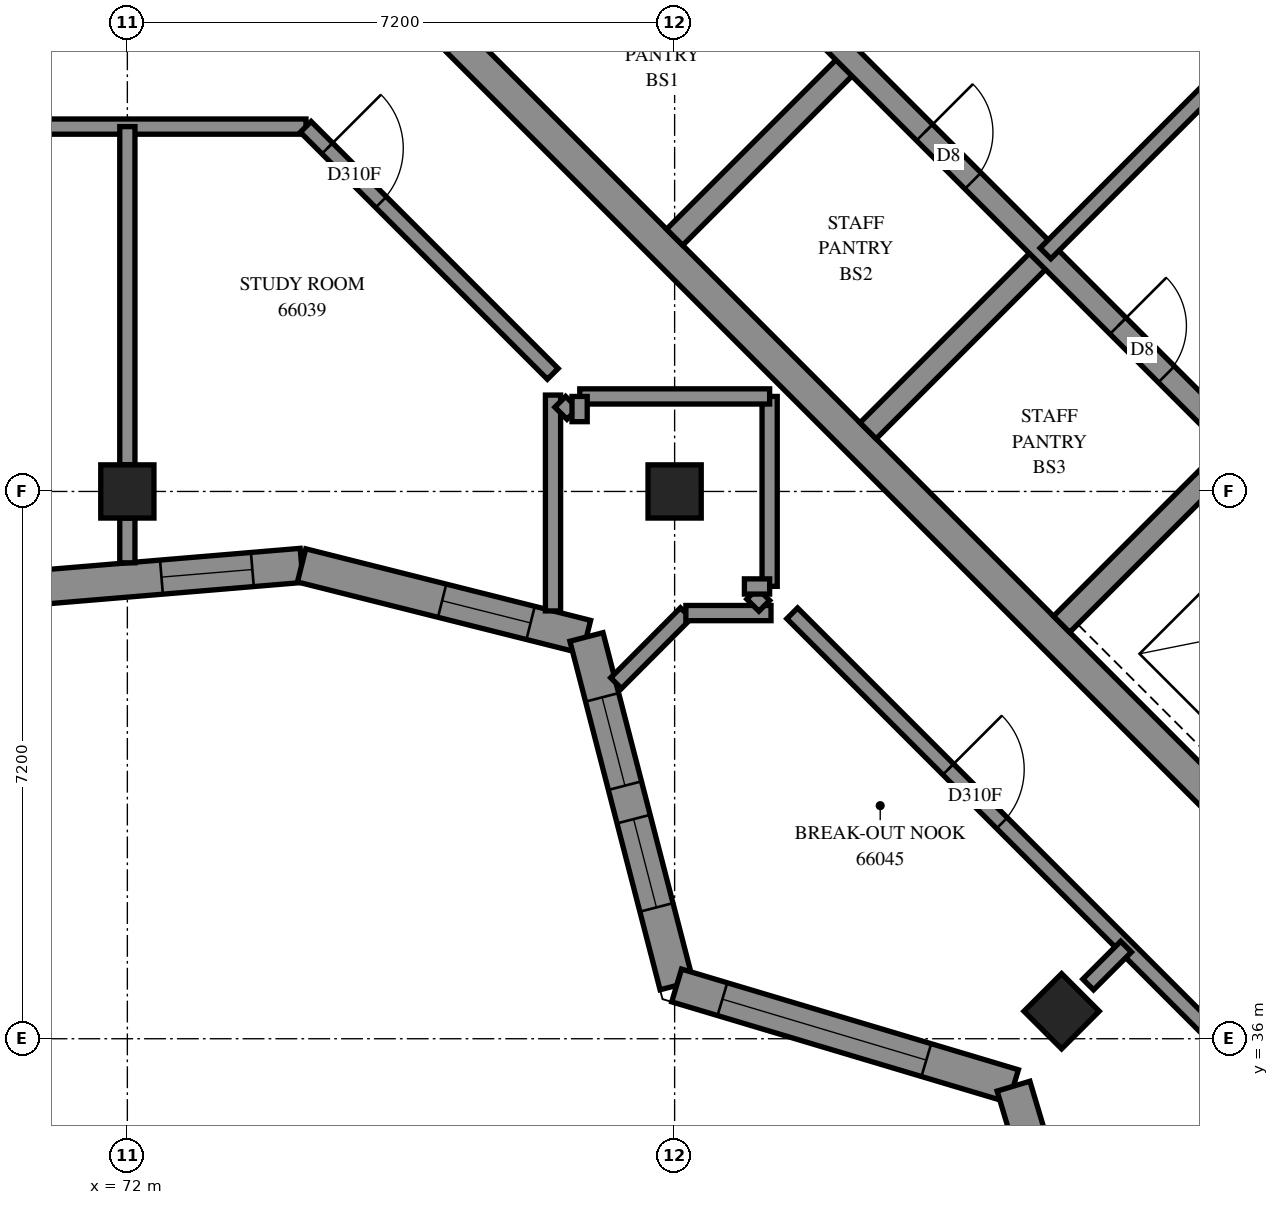
"""IFC4 building model, lengths in metres.
Left out: names, types, materials, properties, quantities, classifications, styles, units other than length and angle.
Written with IfcOpenShell. Run it as: python <this file> out.ifc"""

import sys

from ifc_helpers import new_model, si_unit, direction, frame, frame_2d, origin, origin_2d, place, context, subcontext, project, spatial, polyline, rectangle, outline, extrude, element, fill, save


model = new_model("IFC4")
c1 = context("Model", 3, precision=1e-05, world=origin(), true_north=direction((0.0, 1.0)))
c2 = subcontext(c1, "Body", "Model", "MODEL_VIEW")
j1 = project(units=[si_unit("LENGTHUNIT", "METRE"), si_unit("PLANEANGLEUNIT", "RADIAN")], contexts=[c1])
p1 = place(None, origin())
s1 = spatial("IfcSite", under=j1, at=p1, CompositionType="ELEMENT")
p2 = place(p1, origin())
s2 = spatial("IfcBuilding", under=s1, at=p2, CompositionType="ELEMENT")
p3 = place(p2, frame((0.0, 0.0, 243.8)))
s3 = spatial("IfcBuildingStorey", under=s2, at=p3, CompositionType="ELEMENT", Elevation=243.8)
for number, where, z_axis, x_axis in (
    (1, (72.0, 43.2, 0.0), (0.0, 0.0, 1.0), (1.0, 0.0, 0.0)),
    (2, (79.2, 43.2, 0.0), (0.0, 0.0, 1.0), (1.0, 0.0, 0.0)),
    (3, (84.291, 36.362, 0.0), (0.0, 0.0, 1.0), (0.707, -0.707, 0.0)),
):
    element("IfcColumn", number, at=place(p3, frame(where, z_axis=z_axis, x_axis=x_axis)), inside=s3, PredefinedType="COLUMN", context=c2, shape_type="SweptSolid", body=[
        extrude(rectangle(XDim=0.7, YDim=0.7, at=origin_2d()), origin(), (0.0, 0.0, 1.0), 3.1),
    ])
p4 = place(p3, frame((76.23, 49.231, -0.3), z_axis=(0.0, 0.0, 1.0), x_axis=(0.7071034917, -0.7071100706, 0.0)))
e4 = element("IfcWall", 4, at=p4, inside=s3, PredefinedType="SHEAR", context=c2, shape_type="SweptSolid", body=[
    extrude(rectangle(XDim=15.2, YDim=0.4, at=frame_2d((7.6, 0.0))), origin(), (0.0, 0.0, 1.0), 2.7),
])
p5 = place(p3, frame((79.2, 46.544, 0.0), z_axis=(0.0, 0.0, 1.0), x_axis=(0.7071219326, 0.7070916295, 0.0)))
e5 = element("IfcWall", 5, at=p5, inside=s3, PredefinedType="SOLIDWALL", context=c2, shape_type="SweptSolid", body=[
    extrude(rectangle(XDim=3.3, YDim=0.3, at=frame_2d((1.65, 0.0))), origin(), (0.0, 0.0, 1.0), 3.1),
])
for number, where, z_axis, x_axis in (
    (6, (81.746, 43.999, 0.0), (0.0, 0.0, 1.0), (0.707, 0.707, 0.0)),
    (7, (84.291, 41.453, 0.0), (0.0, 0.0, 1.0), (0.707, 0.707, 0.0)),
):
    element("IfcWall", number, at=place(p3, frame(where, z_axis=z_axis, x_axis=x_axis)), inside=s3, PredefinedType="SOLIDWALL", context=c2, shape_type="SweptSolid", body=[
        extrude(rectangle(XDim=3.3, YDim=0.3, at=frame_2d((1.65, 0.0))), origin(), (0.0, 0.0, 1.0), 3.1),
    ])
p6 = place(p3, frame((78.988, 51.423, 0.0), z_axis=(0.0, 0.0, 1.0), x_axis=(0.7071067812, -0.7071067812, 0.0)))
e8 = element("IfcWall", 8, at=p6, inside=s3, PredefinedType="SOLIDWALL", context=c2, shape_type="SweptSolid", body=[
    extrude(rectangle(XDim=14.4, YDim=0.3, at=frame_2d((7.2, 0.0))), origin(), (0.0, 0.0, 1.0), 3.1),
])
p7 = place(p6, frame((1.35, 0.0, 0.0)))
e9 = element("IfcOpeningElement", 9, at=p7, cuts=e8, PredefinedType="OPENING", context=c2, shape_type="SweptSolid", body=[
    extrude(rectangle(XDim=0.9, YDim=2.1, at=frame_2d((0.45, 1.05))), frame((0.0, 0.16, 0.0), z_axis=(0.0, -1.0, 0.0), x_axis=(1.0, 0.0, 0.0)), (0.0, 0.0, 1.0), 0.32),
])
p8 = place(p6, frame((4.95, 0.0, 0.0)))
e10 = element("IfcOpeningElement", 10, at=p8, cuts=e8, PredefinedType="OPENING", context=c2, shape_type="SweptSolid", body=[
    extrude(rectangle(XDim=0.9, YDim=2.1, at=frame_2d((0.45, 1.05))), frame((0.0, 0.16, 0.0), z_axis=(0.0, -1.0, 0.0), x_axis=(1.0, 0.0, 0.0)), (0.0, 0.0, 1.0), 0.32),
])
p9 = place(p6, frame((8.55, 0.0, 0.0)))
e11 = element("IfcOpeningElement", 11, at=p9, cuts=e8, PredefinedType="OPENING", context=c2, shape_type="SweptSolid", body=[
    extrude(rectangle(XDim=0.9, YDim=2.1, at=frame_2d((0.45, 1.05))), frame((0.0, 0.16, 0.0), z_axis=(0.0, -1.0, 0.0), x_axis=(1.0, 0.0, 0.0)), (0.0, 0.0, 1.0), 0.32),
])
p10 = place(p6, frame((12.05, 0.0, 0.0)))
e12 = element("IfcOpeningElement", 12, at=p10, cuts=e8, PredefinedType="OPENING", context=c2, shape_type="SweptSolid", body=[
    extrude(rectangle(XDim=1.1, YDim=2.1, at=frame_2d((0.55, 1.05))), frame((0.0, 0.16, 0.0), z_axis=(0.0, -1.0, 0.0), x_axis=(1.0, 0.0, 0.0)), (0.0, 0.0, 1.0), 0.32),
])
p11 = place(p3, frame((81.534, 53.969, 0.0), z_axis=(0.0, 0.0, 1.0), x_axis=(0.707103309, -0.7071102534, 0.0)))
e13 = element("IfcWall", 13, at=p11, inside=s3, PredefinedType="SOLIDWALL", context=c2, shape_type="SweptSolid", body=[
    extrude(rectangle(XDim=14.4, YDim=0.3, at=frame_2d((7.2, 0.0))), origin(), (0.0, 0.0, 1.0), 3.1),
])
p12 = place(p11, frame((8.55, 0.0, 0.0)))
e14 = element("IfcOpeningElement", 14, at=p12, cuts=e13, PredefinedType="OPENING", context=c2, shape_type="SweptSolid", body=[
    extrude(rectangle(XDim=0.9, YDim=2.1, at=frame_2d((0.45, 1.05))), frame((0.0, 0.16, 0.0), z_axis=(0.0, -1.0, 0.0), x_axis=(1.0, 0.0, 0.0)), (0.0, 0.0, 1.0), 0.32),
])
p13 = place(p11, frame((1.25, 0.0, 0.0)))
e15 = element("IfcOpeningElement", 15, at=p13, cuts=e13, PredefinedType="OPENING", context=c2, shape_type="SweptSolid", body=[
    extrude(rectangle(XDim=1.1, YDim=2.1, at=frame_2d((0.55, 1.05))), frame((0.0, 0.16, 0.0), z_axis=(0.0, -1.0, 0.0), x_axis=(1.0, 0.0, 0.0)), (0.0, 0.0, 1.0), 0.32),
])
p14 = place(p11, frame((4.85, 0.0, 0.0)))
e16 = element("IfcOpeningElement", 16, at=p14, cuts=e13, PredefinedType="OPENING", context=c2, shape_type="SweptSolid", body=[
    extrude(rectangle(XDim=1.1, YDim=2.1, at=frame_2d((0.55, 1.05))), frame((0.0, 0.16, 0.0), z_axis=(0.0, -1.0, 0.0), x_axis=(1.0, 0.0, 0.0)), (0.0, 0.0, 1.0), 0.32),
])
p15 = place(p11, frame((12.05, 0.0, 0.0)))
e17 = element("IfcOpeningElement", 17, at=p15, cuts=e13, PredefinedType="OPENING", context=c2, shape_type="SweptSolid", body=[
    extrude(rectangle(XDim=1.1, YDim=2.1, at=frame_2d((0.55, 1.05))), frame((0.0, 0.16, 0.0), z_axis=(0.0, -1.0, 0.0), x_axis=(1.0, 0.0, 0.0)), (0.0, 0.0, 1.0), 0.32),
])
p16 = place(p3, frame((70.692, 41.926, 0.0), z_axis=(0.0, 0.0, 1.0), x_axis=(0.9965122743, 0.0834463132, 0.0)))
e18 = element("IfcWall", 18, at=p16, inside=s3, PredefinedType="SOLIDWALL", context=c2, shape_type="SweptSolid", body=[
    extrude(outline(polyline([(-0.019, -0.225), (3.576, -0.225), (3.651, 0.225), (0.019, 0.225), (-0.019, -0.225)])), origin(), (0.0, 0.0, 1.0), 3.1),
])
p17 = place(p16, frame((1.763, 0.0, 0.45)))
e19 = element("IfcOpeningElement", 19, at=p17, cuts=e18, PredefinedType="OPENING", context=c2, shape_type="SweptSolid", body=[
    extrude(rectangle(XDim=1.2, YDim=2.55, at=frame_2d((0.6, 1.275))), frame((0.0, 0.235, 0.0), z_axis=(0.0, -1.0, 0.0), x_axis=(1.0, 0.0, 0.0)), (0.0, 0.0, 1.0), 0.47),
])
p18 = place(p3, frame((74.292, 42.227, 0.0), z_axis=(0.0, 0.0, 1.0), x_axis=(0.9698602389, -0.2436618909, 0.0)))
e20 = element("IfcWall", 20, at=p18, inside=s3, PredefinedType="SOLIDWALL", context=c2, shape_type="SweptSolid", body=[
    extrude(outline(polyline([(0.037, -0.225), (3.731, -0.225), (3.998, 0.225), (-0.037, 0.225), (0.037, -0.225)])), origin(), (0.0, 0.0, 1.0), 3.1),
])
p19 = place(p18, frame((1.906, 0.0, 0.45)))
e21 = element("IfcOpeningElement", 21, at=p19, cuts=e20, PredefinedType="OPENING", context=c2, shape_type="SweptSolid", body=[
    extrude(rectangle(XDim=1.2, YDim=2.55, at=frame_2d((0.6, 1.275))), frame((0.0, 0.235, 0.0), z_axis=(0.0, -1.0, 0.0), x_axis=(1.0, 0.0, 0.0)), (0.0, 0.0, 1.0), 0.47),
])
p20 = place(p3, frame((78.04, 41.286, 0.0), z_axis=(0.0, 0.0, 1.0), x_axis=(0.2504616436, -0.9681265233, 0.0)))
e22 = element("IfcWall", 22, at=p20, inside=s3, PredefinedType="SOLIDWALL", context=c2, shape_type="SweptSolid", body=[
    extrude(outline(polyline([(0.134, -0.225), (4.863, -0.225), (4.609, 0.225), (-0.134, 0.225), (0.134, -0.225)])), origin(), (0.0, 0.0, 1.0), 3.1),
])
p21 = place(p20, frame((0.821, 0.0, 0.45)))
e23 = element("IfcOpeningElement", 23, at=p21, cuts=e22, PredefinedType="OPENING", context=c2, shape_type="SweptSolid", body=[
    extrude(rectangle(XDim=1.2, YDim=2.55, at=frame_2d((0.6, 1.275))), frame((0.0, 0.235, 0.0), z_axis=(0.0, -1.0, 0.0), x_axis=(1.0, 0.0, 0.0)), (0.0, 0.0, 1.0), 0.47),
])
p22 = place(p20, frame((2.475, 0.0, 0.45)))
e24 = element("IfcOpeningElement", 24, at=p22, cuts=e22, PredefinedType="OPENING", context=c2, shape_type="SweptSolid", body=[
    extrude(rectangle(XDim=1.2, YDim=2.55, at=frame_2d((0.6, 1.275))), frame((0.0, 0.235, 0.0), z_axis=(0.0, -1.0, 0.0), x_axis=(1.0, 0.0, 0.0)), (0.0, 0.0, 1.0), 0.47),
])
p23 = place(p3, frame((79.227, 36.701, 0.0), z_axis=(0.0, 0.0, 1.0), x_axis=(0.9581351334, -0.2863163742, 0.0)))
e25 = element("IfcWall", 25, at=p23, inside=s3, PredefinedType="SOLIDWALL", context=c2, shape_type="SweptSolid", body=[
    extrude(outline(polyline([(-0.127, -0.225), (4.504, -0.225), (4.747, 0.225), (0.127, 0.225), (-0.127, -0.225)])), origin(), (0.0, 0.0, 1.0), 3.1),
])
p24 = place(p23, frame((0.628, 0.0, 0.45)))
e26 = element("IfcOpeningElement", 26, at=p24, cuts=e25, PredefinedType="OPENING", context=c2, shape_type="SweptSolid", body=[
    extrude(rectangle(XDim=2.8, YDim=2.55, at=frame_2d((1.4, 1.275))), frame((0.0, 0.235, 0.0), z_axis=(0.0, -1.0, 0.0), x_axis=(1.0, 0.0, 0.0)), (0.0, 0.0, 1.0), 0.47),
])
p25 = place(p3, frame((83.659, 35.376, 0.0), z_axis=(0.0, 0.0, 1.0), x_axis=(0.2863163742, -0.9581351334, 0.0)))
e27 = element("IfcWall", 27, at=p25, inside=s3, PredefinedType="SOLIDWALL", context=c2, shape_type="SweptSolid", body=[
    extrude(outline(polyline([(0.121, -0.225), (4.753, -0.225), (4.499, 0.225), (-0.121, 0.225), (0.121, -0.225)])), origin(), (0.0, 0.0, 1.0), 3.1),
])
p26 = place(p25, frame((1.053, 0.0, 0.45)))
e28 = element("IfcOpeningElement", 28, at=p26, cuts=e27, PredefinedType="OPENING", context=c2, shape_type="SweptSolid", body=[
    extrude(rectangle(XDim=1.2, YDim=2.55, at=frame_2d((0.6, 1.275))), frame((0.0, 0.235, 0.0), z_axis=(0.0, -1.0, 0.0), x_axis=(1.0, 0.0, 0.0)), (0.0, 0.0, 1.0), 0.47),
])
p27 = place(p3, frame((84.079, 46.332, 0.0), z_axis=(0.0, 0.0, 1.0), x_axis=(0.7071067812, 0.7071067812, 0.0)))
e29 = element("IfcWall", 29, at=p27, inside=s3, PredefinedType="PARTITIONING", context=c2, shape_type="SweptSolid", body=[
    extrude(rectangle(XDim=3.6, YDim=0.2, at=frame_2d((1.8, 0.0))), origin(), (0.0, 0.0, 1.0), 3.1),
])
p28 = place(p3, frame((55.2, 48.0, 0.0), z_axis=(0.0, 0.0, 1.0), x_axis=(1.0, 0.0, 0.0)))
e30 = element("IfcWall", 30, at=p28, inside=s3, PredefinedType="PARTITIONING", context=c2, shape_type="SweptSolid", body=[
    extrude(rectangle(XDim=19.15, YDim=0.2, at=frame_2d((9.575, 0.0))), origin(), (0.0, 0.0, 1.0), 3.1),
])
p29 = place(p28, frame((6.299, 0.0, 0.0)))
e31 = element("IfcOpeningElement", 31, at=p29, cuts=e30, PredefinedType="OPENING", context=c2, shape_type="SweptSolid", body=[
    extrude(rectangle(XDim=0.9, YDim=2.1, at=frame_2d((0.45, 1.05))), frame((0.0, 0.11, 0.0), z_axis=(0.0, -1.0, 0.0), x_axis=(1.0, 0.0, 0.0)), (0.0, 0.0, 1.0), 0.22),
])
p30 = place(p28, frame((13.499, 0.0, 0.0)))
e32 = element("IfcOpeningElement", 32, at=p30, cuts=e30, PredefinedType="OPENING", context=c2, shape_type="SweptSolid", body=[
    extrude(rectangle(XDim=0.9, YDim=2.1, at=frame_2d((0.45, 1.05))), frame((0.0, 0.11, 0.0), z_axis=(0.0, -1.0, 0.0), x_axis=(1.0, 0.0, 0.0)), (0.0, 0.0, 1.0), 0.22),
])
p31 = place(p3, frame((84.929, 31.91, 0.0), z_axis=(0.0, 0.0, 1.0), x_axis=(0.7071067812, 0.7071067812, 0.0)))
e33 = element("IfcWall", 33, at=p31, inside=s3, PredefinedType="PARTITIONING", context=c2, shape_type="SweptSolid", body=[
    extrude(rectangle(XDim=11.297, YDim=0.2, at=frame_2d((5.649, 0.0))), origin(), (0.0, 0.0, 1.0), 3.1),
])
p32 = place(p3, frame((80.747, 41.597, 0.0), z_axis=(0.0, 0.0, 1.0), x_axis=(0.7071067812, -0.7071067812, 0.0)))
e34 = element("IfcWall", 34, at=p32, inside=s3, PredefinedType="PARTITIONING", context=c2, shape_type="SweptSolid", body=[
    extrude(rectangle(XDim=8.607, YDim=0.2, at=frame_2d((4.303, 0.0))), origin(), (0.0, 0.0, 1.0), 3.1),
])
p33 = place(p32, frame((2.903, 0.0, 0.0)))
e35 = element("IfcOpeningElement", 35, at=p33, cuts=e34, PredefinedType="OPENING", context=c2, shape_type="SweptSolid", body=[
    extrude(rectangle(XDim=1.0, YDim=2.1, at=frame_2d((0.5, 1.05))), frame((0.0, 0.11, 0.0), z_axis=(0.0, -1.0, 0.0), x_axis=(1.0, 0.0, 0.0)), (0.0, 0.0, 1.0), 0.22),
])
p34 = place(p3, frame((74.347, 47.997, 0.0), z_axis=(0.0, 0.0, 1.0), x_axis=(0.7071067812, -0.7071067812, 0.0)))
e36 = element("IfcWall", 36, at=p34, inside=s3, PredefinedType="PARTITIONING", context=c2, shape_type="SweptSolid", body=[
    extrude(rectangle(XDim=4.596, YDim=0.2, at=frame_2d((2.298, 0.0))), origin(), (0.0, 0.0, 1.0), 3.1),
])
p35 = place(p34, frame((0.401, 0.0, 0.0)))
e37 = element("IfcOpeningElement", 37, at=p35, cuts=e36, PredefinedType="OPENING", context=c2, shape_type="SweptSolid", body=[
    extrude(rectangle(XDim=1.0, YDim=2.1, at=frame_2d((0.5, 1.05))), frame((0.0, 0.11, 0.0), z_axis=(0.0, -1.0, 0.0), x_axis=(1.0, 0.0, 0.0)), (0.0, 0.0, 1.0), 0.22),
])
p36 = place(p3, frame((72.0, 43.55, 0.0), z_axis=(0.0, 0.0, 1.0), x_axis=(0.0, 1.0, 0.0)))
e38 = element("IfcWall", 38, at=p36, inside=s3, PredefinedType="PARTITIONING", context=c2, shape_type="SweptSolid", body=[
    extrude(rectangle(XDim=4.45, YDim=0.2, at=frame_2d((2.225, 0.0))), origin(), (0.0, 0.0, 1.0), 3.1),
])
p37 = place(p3, frame((77.6, 41.628, 0.0), z_axis=(0.0, 0.0, 1.0), x_axis=(0.0, 1.0, 0.0)))
e39 = element("IfcWall", 39, at=p37, inside=s3, PredefinedType="PARTITIONING", context=c2, shape_type="SweptSolid", body=[
    extrude(rectangle(XDim=2.84, YDim=0.2, at=frame_2d((1.42, 0.0))), origin(), (0.0, 0.0, 1.0), 3.1),
])
for number, where, z_axis, x_axis in (
    (40, (80.45, 41.952, 0.0), (0.0, 0.0, 1.0), (0.0, 1.0, 0.0)),
    (41, (77.952, 44.45, 0.0), (0.0, 0.0, 1.0), (1.0, 0.0, 0.0)),
):
    element("IfcWall", number, at=place(p3, frame(where, z_axis=z_axis, x_axis=x_axis)), inside=s3, PredefinedType="PARTITIONING", context=c2, shape_type="SweptSolid", body=[
        extrude(rectangle(XDim=2.498, YDim=0.2, at=frame_2d((1.249, 0.0))), origin(), (0.0, 0.0, 1.0), 3.1),
    ])
p38 = place(p3, frame((78.43, 40.678, 0.0), z_axis=(0.0, 0.0, 1.0), x_axis=(0.7059516948, 0.7082599837, 0.0)))
e42 = element("IfcWall", 42, at=p38, inside=s3, PredefinedType="PARTITIONING", context=c2, shape_type="SweptSolid", body=[
    extrude(rectangle(XDim=1.3, YDim=0.2, at=frame_2d((0.65, 0.0))), origin(), (0.0, 0.0, 1.0), 3.1),
])
p39 = place(p3, frame((79.348, 41.6, 0.0), z_axis=(0.0, 0.0, 1.0), x_axis=(1.0, 0.0, 0.0)))
e43 = element("IfcWall", 43, at=p39, inside=s3, PredefinedType="PARTITIONING", context=c2, shape_type="SweptSolid", body=[
    extrude(rectangle(XDim=1.12, YDim=0.2, at=frame_2d((0.56, 0.0))), origin(), (0.0, 0.0, 1.0), 3.1),
])
p40 = place(p3, frame((84.641, 36.713, 0.0), z_axis=(0.0, 0.0, 1.0), x_axis=(0.7071067812, 0.7071067812, 0.0)))
e44 = element("IfcWall", 44, at=p40, inside=s3, PredefinedType="PARTITIONING", context=c2, shape_type="SweptSolid", body=[
    extrude(rectangle(XDim=0.704, YDim=0.2, at=frame_2d((0.352, 0.0))), origin(), (0.0, 0.0, 1.0), 3.1),
])
p41 = place(p3, frame((72.0, 42.261, 0.0), z_axis=(0.0, 0.0, 1.0), x_axis=(0.0, 1.0, 0.0)))
e45 = element("IfcWall", 45, at=p41, inside=s3, PredefinedType="PARTITIONING", context=c2, shape_type="SweptSolid", body=[
    extrude(rectangle(XDim=0.589, YDim=0.2, at=frame_2d((0.294, 0.0))), origin(), (0.0, 0.0, 1.0), 3.1),
])
for number, where, z_axis, x_axis in (
    (46, (80.221, 41.855, 0.0), (0.0, 0.0, 1.0), (0.707, -0.707, 0.0)),
    (47, (77.695, 44.38, 0.0), (0.0, 0.0, 1.0), (0.707, -0.707, 0.0)),
):
    element("IfcWall", number, at=place(p3, frame(where, z_axis=z_axis, x_axis=x_axis)), inside=s3, PredefinedType="PARTITIONING", context=c2, shape_type="SweptSolid", body=[
        extrude(rectangle(XDim=0.225, YDim=0.2, at=frame_2d((0.112, 0.0))), origin(), (0.0, 0.0, 1.0), 3.1),
    ])
for number, where, z_axis, x_axis in (
    (48, (80.118, 41.95, 0.0), (0.0, 0.0, 1.0), (1.0, 0.0, 0.0)),
    (49, (77.95, 44.118, 0.0), (0.0, 0.0, 1.0), (0.0, 1.0, 0.0)),
):
    element("IfcWall", number, at=place(p3, frame(where, z_axis=z_axis, x_axis=x_axis)), inside=s3, PredefinedType="PARTITIONING", context=c2, shape_type="SweptSolid", body=[
        extrude(rectangle(XDim=0.332, YDim=0.2, at=frame_2d((0.166, 0.0))), origin(), (0.0, 0.0, 1.0), 3.1),
    ])
p42 = place(p17, origin())
e50 = element("IfcWindow", 50, at=p42, inside=s3, PartitioningType="SINGLE_PANEL", PredefinedType="WINDOW", context=c2, shape_type="SweptSolid", body=[
    extrude(rectangle(XDim=1.2, YDim=2.55, at=frame_2d((0.6, 1.275))), frame((0.0, 0.205, 0.0), z_axis=(0.0, -1.0, 0.0), x_axis=(1.0, 0.0, 0.0)), (0.0, 0.0, 1.0), 0.06),
])
fill(e19, e50)
p43 = place(p19, origin())
e51 = element("IfcWindow", 51, at=p43, inside=s3, PartitioningType="SINGLE_PANEL", PredefinedType="WINDOW", context=c2, shape_type="SweptSolid", body=[
    extrude(rectangle(XDim=1.2, YDim=2.55, at=frame_2d((0.6, 1.275))), frame((0.0, 0.205, 0.0), z_axis=(0.0, -1.0, 0.0), x_axis=(1.0, 0.0, 0.0)), (0.0, 0.0, 1.0), 0.06),
])
fill(e21, e51)
p44 = place(p21, origin())
e52 = element("IfcWindow", 52, at=p44, inside=s3, PartitioningType="SINGLE_PANEL", PredefinedType="WINDOW", context=c2, shape_type="SweptSolid", body=[
    extrude(rectangle(XDim=1.2, YDim=2.55, at=frame_2d((0.6, 1.275))), frame((0.0, 0.205, 0.0), z_axis=(0.0, -1.0, 0.0), x_axis=(1.0, 0.0, 0.0)), (0.0, 0.0, 1.0), 0.06),
])
fill(e23, e52)
p45 = place(p22, origin())
e53 = element("IfcWindow", 53, at=p45, inside=s3, PartitioningType="SINGLE_PANEL", PredefinedType="WINDOW", context=c2, shape_type="SweptSolid", body=[
    extrude(rectangle(XDim=1.2, YDim=2.55, at=frame_2d((0.6, 1.275))), frame((0.0, 0.205, 0.0), z_axis=(0.0, -1.0, 0.0), x_axis=(1.0, 0.0, 0.0)), (0.0, 0.0, 1.0), 0.06),
])
fill(e24, e53)
p46 = place(p24, origin())
e54 = element("IfcWindow", 54, at=p46, inside=s3, PartitioningType="SINGLE_PANEL", PredefinedType="WINDOW", context=c2, shape_type="SweptSolid", body=[
    extrude(rectangle(XDim=2.8, YDim=2.55, at=frame_2d((1.4, 1.275))), frame((0.0, 0.205, 0.0), z_axis=(0.0, -1.0, 0.0), x_axis=(1.0, 0.0, 0.0)), (0.0, 0.0, 1.0), 0.06),
])
fill(e26, e54)
p47 = place(p8, origin())
e55 = element("IfcDoor", 55, at=p47, inside=s3, OperationType="SINGLE_SWING_LEFT", PredefinedType="DOOR", context=c2, shape_type="SweptSolid", body=[
    extrude(rectangle(XDim=0.9, YDim=2.1, at=frame_2d((0.45, 1.05))), frame((0.0, 0.025, 0.0), z_axis=(0.0, -1.0, 0.0), x_axis=(1.0, 0.0, 0.0)), (0.0, 0.0, 1.0), 0.05),
])
fill(e10, e55)
p48 = place(p9, origin())
e56 = element("IfcDoor", 56, at=p48, inside=s3, OperationType="SINGLE_SWING_LEFT", PredefinedType="DOOR", context=c2, shape_type="SweptSolid", body=[
    extrude(rectangle(XDim=0.9, YDim=2.1, at=frame_2d((0.45, 1.05))), frame((0.0, 0.025, 0.0), z_axis=(0.0, -1.0, 0.0), x_axis=(1.0, 0.0, 0.0)), (0.0, 0.0, 1.0), 0.05),
])
fill(e11, e56)
p49 = place(p35, origin())
e57 = element("IfcDoor", 57, at=p49, inside=s3, OperationType="SINGLE_SWING_LEFT", PredefinedType="DOOR", context=c2, shape_type="SweptSolid", body=[
    extrude(rectangle(XDim=1.0, YDim=2.1, at=frame_2d((0.5, 1.05))), frame((0.0, 0.025, 0.0), z_axis=(0.0, -1.0, 0.0), x_axis=(1.0, 0.0, 0.0)), (0.0, 0.0, 1.0), 0.05),
])
fill(e37, e57)
p50 = place(p33, origin())
e58 = element("IfcDoor", 58, at=p50, inside=s3, OperationType="SINGLE_SWING_RIGHT", PredefinedType="DOOR", context=c2, shape_type="SweptSolid", body=[
    extrude(rectangle(XDim=1.0, YDim=2.1, at=frame_2d((0.5, 1.05))), frame((0.0, 0.025, 0.0), z_axis=(0.0, -1.0, 0.0), x_axis=(1.0, 0.0, 0.0)), (0.0, 0.0, 1.0), 0.05),
])
fill(e35, e58)
save(model, sys.argv[1])
